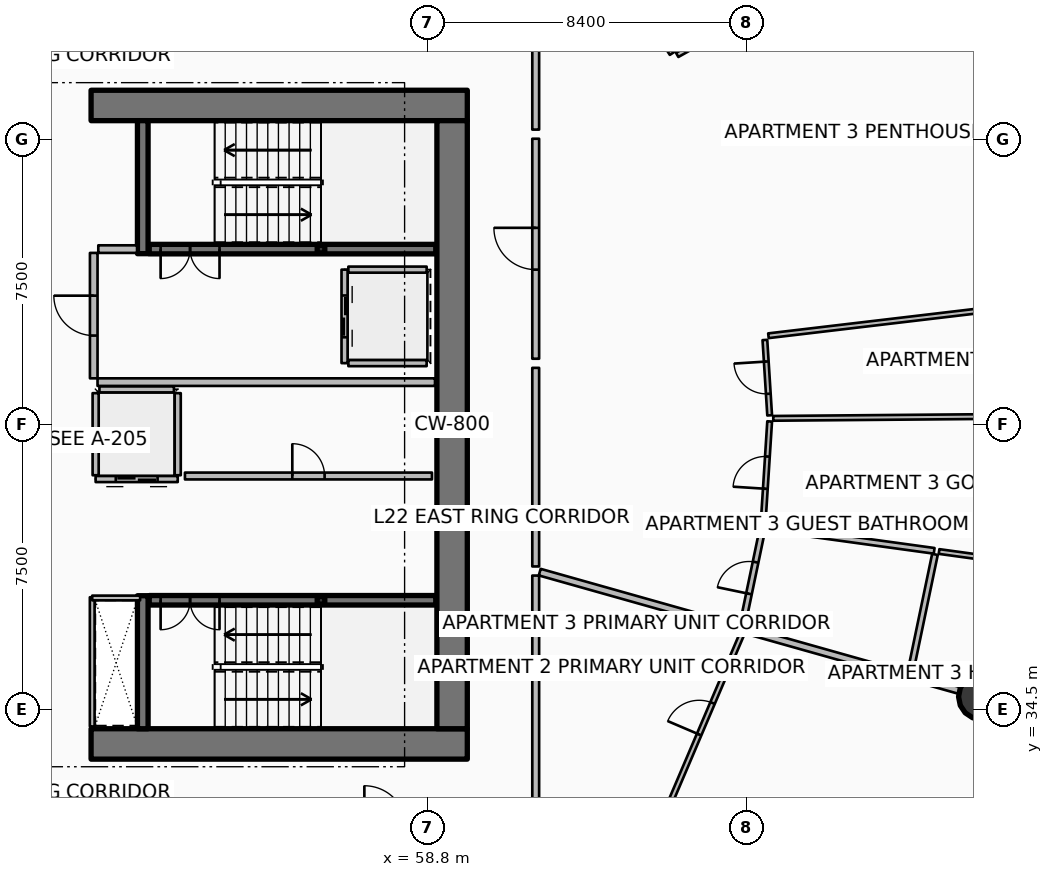
"""IFC4 building model, lengths in metres.
Left out: names, types, materials, properties, quantities, classifications, styles, units other than length and angle.
Written with IfcOpenShell. Run it as: python <this file> out.ifc"""

import sys

from ifc_helpers import new_model, si_unit, direction, frame, frame_2d, origin, origin_2d, place, context, subcontext, project, spatial, rectangle, hollow_rectangle, circle, extrude, element, fill, save


model = new_model("IFC4")
c1 = context("Model", 3, precision=1e-05, world=origin(), true_north=direction((0.0, 1.0)))
c2 = subcontext(c1, "Body", "Model", "MODEL_VIEW")
j1 = project(units=[si_unit("LENGTHUNIT", "METRE"), si_unit("PLANEANGLEUNIT", "RADIAN")], contexts=[c1])
p1 = place(None, origin())
s1 = spatial("IfcSite", under=j1, at=p1, CompositionType="ELEMENT")
p2 = place(p1, origin())
s2 = spatial("IfcBuilding", under=s1, at=p2, CompositionType="ELEMENT")
p3 = place(p2, frame((0.0, 0.0, 90.15)))
s3 = spatial("IfcBuildingStorey", under=s2, at=p3, CompositionType="ELEMENT", Elevation=90.15)
for number, where, z_axis, x_axis in (
    (1, (49.95, 33.6, 0.0), (0.0, 0.0, 1.0), (1.0, 0.0, 0.0)),
    (2, (49.95, 50.4, 0.0), (0.0, 0.0, 1.0), (1.0, 0.0, 0.0)),
):
    element("IfcWall", number, at=place(p3, frame(where, z_axis=z_axis, x_axis=x_axis)), inside=s3, PredefinedType="SHEAR", context=c2, shape_type="SweptSolid", body=[
        extrude(rectangle(XDim=9.9, YDim=0.8, at=frame_2d((4.95, 0.0))), origin(), (0.0, 0.0, 1.0), 3.75),
    ])
p4 = place(p3, frame((59.45, 34.0, 0.0), z_axis=(0.0, 0.0, 1.0), x_axis=(0.0, 1.0, 0.0)))
e3 = element("IfcWall", 3, at=p4, inside=s3, PredefinedType="SHEAR", context=c2, shape_type="SweptSolid", body=[
    extrude(rectangle(XDim=16.0, YDim=0.8, at=frame_2d((8.0, 0.0))), origin(), (0.0, 0.0, 1.0), 3.75),
])
for number, where, z_axis, x_axis in (
    (4, (51.31, 46.5, 0.0), (0.0, 0.0, 1.0), (0.0, 1.0, 0.0)),
    (5, (51.31, 34.0, 0.0), (0.0, 0.0, 1.0), (0.0, 1.0, 0.0)),
):
    element("IfcWall", number, at=place(p3, frame(where, z_axis=z_axis, x_axis=x_axis)), inside=s3, PredefinedType="SHEAR", context=c2, shape_type="SweptSolid", body=[
        extrude(rectangle(XDim=3.5, YDim=0.28, at=frame_2d((1.75, 0.0))), origin(), (0.0, 0.0, 1.0), 3.75),
    ])
for number, where, z_axis, x_axis in (
    (6, (56.0, 46.62, 0.0), (0.0, 0.0, 1.0), (1.0, 0.0, 0.0)),
    (7, (56.0, 37.38, 0.0), (0.0, 0.0, 1.0), (1.0, 0.0, 0.0)),
):
    element("IfcColumn", number, at=place(p3, frame(where, z_axis=z_axis, x_axis=x_axis)), inside=s3, PredefinedType="COLUMN", context=c2, shape_type="SweptSolid", body=[
        extrude(hollow_rectangle(XDim=0.2, YDim=0.2, WallThickness=0.01, InnerFilletRadius=0.01, OuterFilletRadius=0.02, at=origin_2d()), origin(), (0.0, 0.0, 1.0), 1.67),
    ])
p5 = place(p3, frame((73.377, 34.843, 0.0), z_axis=(0.0, 0.0, 1.0), x_axis=(1.0, 0.0, 0.0)))
e8 = element("IfcColumn", 8, at=p5, inside=s3, PredefinedType="COLUMN", context=c2, shape_type="SweptSolid", body=[
    extrude(circle(Radius=0.6, at=origin_2d()), origin(), (0.0, 0.0, 1.0), 3.5),
])
p6 = place(p3, frame((68.593, 25.702, 0.0), z_axis=(0.0, 0.0, 1.0), x_axis=(0.636704975, 0.771107498868, 0.0)))
e9 = element("IfcWall", 9, at=p6, inside=s3, PredefinedType="SOLIDWALL", context=c2, shape_type="SweptSolid", body=[
    extrude(rectangle(XDim=11.084, YDim=0.24, at=frame_2d((5.542, 0.0))), origin(), (0.0, 0.0, 1.0), 2.45),
])
p7 = place(p6, frame((8.864, 0.0, 0.0)))
e10 = element("IfcOpeningElement", 10, at=p7, cuts=e9, PredefinedType="OPENING", context=c2, shape_type="SweptSolid", body=[
    extrude(rectangle(XDim=1.45, YDim=2.15, at=frame_2d((0.725, 1.075))), frame((0.0, 0.13, 0.0), z_axis=(0.0, -1.0, 0.0), x_axis=(1.0, 0.0, 0.0)), (0.0, 0.0, 1.0), 0.26),
])
p8 = place(p6, frame((0.28, 0.0, 0.65)))
e11 = element("IfcOpeningElement", 11, at=p8, cuts=e9, PredefinedType="OPENING", context=c2, shape_type="SweptSolid", body=[
    extrude(rectangle(XDim=1.6, YDim=1.5, at=frame_2d((0.8, 0.75))), frame((0.0, 0.13, 0.0), z_axis=(0.0, -1.0, 0.0), x_axis=(1.0, 0.0, 0.0)), (0.0, 0.0, 1.0), 0.26),
])
p9 = place(p3, frame((51.48, 46.62, 0.0), z_axis=(0.0, 0.0, 1.0), x_axis=(1.0, 0.0, 0.0)))
e12 = element("IfcWall", 12, at=p9, inside=s3, PredefinedType="SOLIDWALL", context=c2, shape_type="SweptSolid", body=[
    extrude(rectangle(XDim=7.54, YDim=0.25, at=frame_2d((3.77, 0.0))), origin(), (0.0, 0.0, 1.0), 3.5),
])
p10 = place(p9, frame((0.3, 0.0, 0.0)))
e13 = element("IfcOpeningElement", 13, at=p10, cuts=e12, PredefinedType="OPENING", context=c2, shape_type="SweptSolid", body=[
    extrude(rectangle(XDim=1.55, YDim=2.15, at=frame_2d((0.775, 1.075))), frame((0.0, 0.135, 0.0), z_axis=(0.0, -1.0, 0.0), x_axis=(1.0, 0.0, 0.0)), (0.0, 0.0, 1.0), 0.27),
])
p11 = place(p3, frame((51.48, 37.38, 0.0), z_axis=(0.0, 0.0, 1.0), x_axis=(1.0, 0.0, 0.0)))
e14 = element("IfcWall", 14, at=p11, inside=s3, PredefinedType="SOLIDWALL", context=c2, shape_type="SweptSolid", body=[
    extrude(rectangle(XDim=7.54, YDim=0.25, at=frame_2d((3.77, 0.0))), origin(), (0.0, 0.0, 1.0), 3.5),
])
p12 = place(p11, frame((0.3, 0.0, 0.0)))
e15 = element("IfcOpeningElement", 15, at=p12, cuts=e14, PredefinedType="OPENING", context=c2, shape_type="SweptSolid", body=[
    extrude(rectangle(XDim=1.55, YDim=2.15, at=frame_2d((0.775, 1.075))), frame((0.0, 0.135, 0.0), z_axis=(0.0, -1.0, 0.0), x_axis=(1.0, 0.0, 0.0)), (0.0, 0.0, 1.0), 0.27),
])
p13 = place(p3, frame((56.62, 46.08, 0.0), z_axis=(0.0, 0.0, 1.0), x_axis=(0.0, -1.0, 0.0)))
e16 = element("IfcWall", 16, at=p13, inside=s3, PredefinedType="PARTITIONING", context=c2, shape_type="SweptSolid", body=[
    extrude(rectangle(XDim=2.46, YDim=0.16, at=frame_2d((1.23, 0.0))), origin(), (0.0, 0.0, 1.0), 3.5),
])
p14 = place(p13, frame((0.68, 0.0, 0.0)))
e17 = element("IfcOpeningElement", 17, at=p14, cuts=e16, PredefinedType="OPENING", context=c2, shape_type="SweptSolid", body=[
    extrude(rectangle(XDim=1.1, YDim=2.1, at=frame_2d((0.55, 1.05))), frame((0.0, 0.09, 0.0), z_axis=(0.0, -1.0, 0.0), x_axis=(1.0, 0.0, 0.0)), (0.0, 0.0, 1.0), 0.18),
])
for number, where, z_axis, x_axis in (
    (18, (56.72, 46.08, 0.0), (0.0, 0.0, 1.0), (1.0, 0.0, 0.0)),
    (19, (56.72, 43.62, 0.0), (0.0, 0.0, 1.0), (1.0, 0.0, 0.0)),
):
    element("IfcWall", number, at=place(p3, frame(where, z_axis=z_axis, x_axis=x_axis)), inside=s3, PredefinedType="PARTITIONING", context=c2, shape_type="SweptSolid", body=[
        extrude(rectangle(XDim=2.06, YDim=0.16, at=frame_2d((1.03, 0.0))), origin(), (0.0, 0.0, 1.0), 3.5),
    ])
p15 = place(p3, frame((52.23, 40.57, 0.0), z_axis=(0.0, 0.0, 1.0), x_axis=(-1.0, 0.0, 0.0)))
e20 = element("IfcWall", 20, at=p15, inside=s3, PredefinedType="PARTITIONING", context=c2, shape_type="SweptSolid", body=[
    extrude(rectangle(XDim=2.16, YDim=0.16, at=frame_2d((1.08, 0.0))), origin(), (0.0, 0.0, 1.0), 3.5),
])
p16 = place(p15, frame((0.53, 0.0, 0.0)))
e21 = element("IfcOpeningElement", 21, at=p16, cuts=e20, PredefinedType="OPENING", context=c2, shape_type="SweptSolid", body=[
    extrude(rectangle(XDim=1.1, YDim=2.1, at=frame_2d((0.55, 1.05))), frame((0.0, 0.09, 0.0), z_axis=(0.0, -1.0, 0.0), x_axis=(1.0, 0.0, 0.0)), (0.0, 0.0, 1.0), 0.18),
])
for number, where, z_axis, x_axis in (
    (22, (52.23, 40.67, 0.0), (0.0, 0.0, 1.0), (0.0, 1.0, 0.0)),
    (23, (50.07, 40.67, 0.0), (0.0, 0.0, 1.0), (0.0, 1.0, 0.0)),
):
    element("IfcWall", number, at=place(p3, frame(where, z_axis=z_axis, x_axis=x_axis)), inside=s3, PredefinedType="PARTITIONING", context=c2, shape_type="SweptSolid", body=[
        extrude(rectangle(XDim=2.16, YDim=0.16, at=frame_2d((1.08, 0.0))), origin(), (0.0, 0.0, 1.0), 3.5),
    ])
p17 = place(p3, frame((50.17, 42.93, 0.0), z_axis=(0.0, 0.0, 1.0), x_axis=(1.0, 0.0, 0.0)))
e24 = element("IfcWall", 24, at=p17, inside=s3, PredefinedType="PARTITIONING", context=c2, shape_type="SweptSolid", body=[
    extrude(rectangle(XDim=1.96, YDim=0.16, at=frame_2d((0.98, 0.0))), origin(), (0.0, 0.0, 1.0), 3.5),
])
p18 = place(p3, frame((52.42, 40.65, 0.0), z_axis=(0.0, 0.0, 1.0), x_axis=(1.0, 0.0, 0.0)))
e25 = element("IfcWall", 25, at=p18, inside=s3, PredefinedType="PARTITIONING", context=c2, shape_type="SweptSolid", body=[
    extrude(rectangle(XDim=6.5, YDim=0.18, at=frame_2d((3.25, 0.0))), origin(), (0.0, 0.0, 1.0), 3.5),
])
p19 = place(p18, frame((2.825, 0.0, 0.0)))
e26 = element("IfcOpeningElement", 26, at=p19, cuts=e25, PredefinedType="OPENING", context=c2, shape_type="SweptSolid", body=[
    extrude(rectangle(XDim=0.85, YDim=2.06, at=frame_2d((0.425, 1.03))), frame((0.0, 0.1, 0.0), z_axis=(0.0, -1.0, 0.0), x_axis=(1.0, 0.0, 0.0)), (0.0, 0.0, 1.0), 0.2),
])
p20 = place(p3, frame((50.12, 43.12, 0.0), z_axis=(0.0, 0.0, 1.0), x_axis=(1.0, 0.0, 0.0)))
e27 = element("IfcWall", 27, at=p20, inside=s3, PredefinedType="PARTITIONING", context=c2, shape_type="SweptSolid", body=[
    extrude(rectangle(XDim=8.88, YDim=0.2, at=frame_2d((4.44, 0.0))), origin(), (0.0, 0.0, 1.0), 3.5),
])
p21 = place(p3, frame((50.14, 46.62, 0.0), z_axis=(0.0, 0.0, 1.0), x_axis=(1.0, 0.0, 0.0)))
e28 = element("IfcWall", 28, at=p21, inside=s3, PredefinedType="PARTITIONING", context=c2, shape_type="SweptSolid", body=[
    extrude(rectangle(XDim=1.02, YDim=0.2, at=frame_2d((0.51, 0.0))), origin(), (0.0, 0.0, 1.0), 3.5),
])
p22 = place(p3, frame((50.02, 43.22, 0.0), z_axis=(0.0, 0.0, 1.0), x_axis=(0.0, 1.0, 0.0)))
e29 = element("IfcWall", 29, at=p22, inside=s3, PredefinedType="PARTITIONING", context=c2, shape_type="SweptSolid", body=[
    extrude(rectangle(XDim=3.3, YDim=0.2, at=frame_2d((1.65, 0.0))), origin(), (0.0, 0.0, 1.0), 3.5),
])
p23 = place(p22, frame((1.125, 0.0, 0.0)))
e30 = element("IfcOpeningElement", 30, at=p23, cuts=e29, PredefinedType="OPENING", context=c2, shape_type="SweptSolid", body=[
    extrude(rectangle(XDim=1.05, YDim=2.1, at=frame_2d((0.525, 1.05))), frame((0.0, 0.11, 0.0), z_axis=(0.0, -1.0, 0.0), x_axis=(1.0, 0.0, 0.0)), (0.0, 0.0, 1.0), 0.22),
])
p24 = place(p3, frame((49.98, 34.06, 0.0), z_axis=(0.0, 0.0, 1.0), x_axis=(0.0, 1.0, 0.0)))
e31 = element("IfcWall", 31, at=p24, inside=s3, PredefinedType="PARTITIONING", context=c2, shape_type="SweptSolid", body=[
    extrude(rectangle(XDim=3.4, YDim=0.125, at=frame_2d((1.7, 0.0))), origin(), (0.0, 0.0, 1.0), 2.94),
])
p25 = place(p3, frame((49.98, 37.44, 0.0), z_axis=(0.0, 0.0, 1.0), x_axis=(1.0, 0.0, 0.0)))
e32 = element("IfcWall", 32, at=p25, inside=s3, PredefinedType="PARTITIONING", context=c2, shape_type="SweptSolid", body=[
    extrude(rectangle(XDim=1.26, YDim=0.125, at=frame_2d((0.63, 0.0))), origin(), (0.0, 0.0, 1.0), 2.94),
])
p26 = place(p3, frame((61.756, 38.12, 0.0), z_axis=(0.0, 0.0, 1.0), x_axis=(0.962455861176, -0.271438234756, 0.0)))
e33 = element("IfcWall", 33, at=p26, inside=s3, PredefinedType="PARTITIONING", context=c2, shape_type="SweptSolid", body=[
    extrude(rectangle(XDim=14.279, YDim=0.18, at=frame_2d((7.139, 0.0))), origin(), (0.0, 0.0, 1.0), 2.94),
])
p27 = place(p3, frame((61.65, 31.52, 0.0), z_axis=(0.0, 0.0, 1.0), x_axis=(0.0, 1.0, 0.0)))
e34 = element("IfcWall", 34, at=p27, inside=s3, PredefinedType="PARTITIONING", context=c2, shape_type="SweptSolid", body=[
    extrude(rectangle(XDim=6.51, YDim=0.18, at=frame_2d((3.255, 0.0))), origin(), (0.0, 0.0, 1.0), 2.94),
])
p28 = place(p3, frame((65.168, 32.012, 0.0), z_axis=(0.0, 0.0, 1.0), x_axis=(0.392094288326, 0.91992503448, 0.0)))
e35 = element("IfcWall", 35, at=p28, inside=s3, PredefinedType="PARTITIONING", context=c2, shape_type="SweptSolid", body=[
    extrude(rectangle(XDim=4.894, YDim=0.125, at=frame_2d((2.447, 0.0))), origin(), (0.0, 0.0, 1.0), 2.94),
])
p29 = place(p28, frame((1.997, 0.0, 0.0)))
e36 = element("IfcOpeningElement", 36, at=p29, cuts=e35, PredefinedType="OPENING", context=c2, shape_type="SweptSolid", body=[
    extrude(rectangle(XDim=0.9, YDim=2.08, at=frame_2d((0.45, 1.04))), frame((0.0, 0.073, 0.0), z_axis=(0.0, -1.0, 0.0), x_axis=(1.0, 0.0, 0.0)), (0.0, 0.0, 1.0), 0.145),
])
p30 = place(p3, frame((61.65, 43.736, 0.0), z_axis=(0.0, 0.0, 1.0), x_axis=(0.0, 1.0, 0.0)))
e37 = element("IfcWall", 37, at=p30, inside=s3, PredefinedType="PARTITIONING", context=c2, shape_type="SweptSolid", body=[
    extrude(rectangle(XDim=5.789, YDim=0.18, at=frame_2d((2.895, 0.0))), origin(), (0.0, 0.0, 1.0), 2.94),
])
p31 = place(p30, frame((2.344, 0.0, 0.0)))
e38 = element("IfcOpeningElement", 38, at=p31, cuts=e37, PredefinedType="OPENING", context=c2, shape_type="SweptSolid", body=[
    extrude(rectangle(XDim=1.1, YDim=2.1, at=frame_2d((0.55, 1.05))), frame((0.0, 0.1, 0.0), z_axis=(0.0, -1.0, 0.0), x_axis=(1.0, 0.0, 0.0)), (0.0, 0.0, 1.0), 0.2),
])
p32 = place(p3, frame((61.65, 38.27, 0.0), z_axis=(0.0, 0.0, 1.0), x_axis=(0.0, 1.0, 0.0)))
e39 = element("IfcWall", 39, at=p32, inside=s3, PredefinedType="PARTITIONING", context=c2, shape_type="SweptSolid", body=[
    extrude(rectangle(XDim=5.225, YDim=0.18, at=frame_2d((2.613, 0.0))), origin(), (0.0, 0.0, 1.0), 2.94),
])
p33 = place(p3, frame((67.774, 44.341, 0.0), z_axis=(0.0, 0.0, 1.0), x_axis=(0.993071471329, 0.117511926341, 0.0)))
e40 = element("IfcWall", 40, at=p33, inside=s3, PredefinedType="PARTITIONING", context=c2, shape_type="SweptSolid", body=[
    extrude(rectangle(XDim=9.567, YDim=0.125, at=frame_2d((4.784, 0.0))), origin(), (0.0, 0.0, 1.0), 2.94),
])
p34 = place(p3, frame((67.089, 36.72, 0.0), z_axis=(0.0, 0.0, 1.0), x_axis=(0.204314138463, 0.978905374806, 0.0)))
e41 = element("IfcWall", 41, at=p34, inside=s3, PredefinedType="PARTITIONING", context=c2, shape_type="SweptSolid", body=[
    extrude(rectangle(XDim=2.546, YDim=0.15, at=frame_2d((1.273, 0.0))), origin(), (0.0, 0.0, 1.0), 2.94),
])
p35 = place(p34, frame((0.848, 0.0, 0.0)))
e42 = element("IfcOpeningElement", 42, at=p35, cuts=e41, PredefinedType="OPENING", context=c2, shape_type="SweptSolid", body=[
    extrude(rectangle(XDim=0.85, YDim=2.06, at=frame_2d((0.425, 1.03))), frame((0.0, 0.085, 0.0), z_axis=(0.0, -1.0, 0.0), x_axis=(1.0, 0.0, 0.0)), (0.0, 0.0, 1.0), 0.17),
])
p36 = place(p3, frame((71.506, 35.474, 0.0), z_axis=(0.0, 0.0, 1.0), x_axis=(0.204346617078, 0.978898595407, 0.0)))
e43 = element("IfcWall", 43, at=p36, inside=s3, PredefinedType="PARTITIONING", context=c2, shape_type="SweptSolid", body=[
    extrude(rectangle(XDim=3.18, YDim=0.15, at=frame_2d((1.59, 0.0))), origin(), (0.0, 0.0, 1.0), 2.94),
])
p37 = place(p3, frame((67.717, 39.289, 0.0), z_axis=(0.0, 0.0, 1.0), x_axis=(0.99067496126, -0.136246545396, 0.0)))
e44 = element("IfcWall", 44, at=p37, inside=s3, PredefinedType="PARTITIONING", context=c2, shape_type="SweptSolid", body=[
    extrude(rectangle(XDim=4.46, YDim=0.15, at=frame_2d((2.23, 0.0))), origin(), (0.0, 0.0, 1.0), 2.94),
])
p38 = place(p3, frame((72.264, 38.663, 0.0), z_axis=(0.0, 0.0, 1.0), x_axis=(0.990677467282, -0.136228322381, 0.0)))
e45 = element("IfcWall", 45, at=p38, inside=s3, PredefinedType="PARTITIONING", context=c2, shape_type="SweptSolid", body=[
    extrude(rectangle(XDim=4.201, YDim=0.125, at=frame_2d((2.1, 0.0))), origin(), (0.0, 0.0, 1.0), 2.94),
])
p39 = place(p38, frame((1.675, 0.0, 0.0)))
e46 = element("IfcOpeningElement", 46, at=p39, cuts=e45, PredefinedType="OPENING", context=c2, shape_type="SweptSolid", body=[
    extrude(rectangle(XDim=0.85, YDim=2.06, at=frame_2d((0.425, 1.03))), frame((0.0, 0.073, 0.0), z_axis=(0.0, -1.0, 0.0), x_axis=(1.0, 0.0, 0.0)), (0.0, 0.0, 1.0), 0.145),
])
p40 = place(p3, frame((67.901, 42.167, 0.0), z_axis=(0.0, 0.0, 1.0), x_axis=(0.999964927596, 0.008375176238, 0.0)))
e47 = element("IfcWall", 47, at=p40, inside=s3, PredefinedType="PARTITIONING", context=c2, shape_type="SweptSolid", body=[
    extrude(rectangle(XDim=9.416, YDim=0.125, at=frame_2d((4.708, 0.0))), origin(), (0.0, 0.0, 1.0), 2.94),
])
p41 = place(p3, frame((67.633, 39.391, 0.0), z_axis=(0.0, 0.0, 1.0), x_axis=(0.064077427582, 0.997944929981, 0.0)))
e48 = element("IfcWall", 48, at=p41, inside=s3, PredefinedType="PARTITIONING", context=c2, shape_type="SweptSolid", body=[
    extrude(rectangle(XDim=2.701, YDim=0.125, at=frame_2d((1.351, 0.0))), origin(), (0.0, 0.0, 1.0), 2.94),
])
p42 = place(p41, frame((0.926, 0.0, 0.0)))
e49 = element("IfcOpeningElement", 49, at=p42, cuts=e48, PredefinedType="OPENING", context=c2, shape_type="SweptSolid", body=[
    extrude(rectangle(XDim=0.85, YDim=2.06, at=frame_2d((0.425, 1.03))), frame((0.0, 0.073, 0.0), z_axis=(0.0, -1.0, 0.0), x_axis=(1.0, 0.0, 0.0)), (0.0, 0.0, 1.0), 0.145),
])
p43 = place(p3, frame((67.806, 42.246, 0.0), z_axis=(0.0, 0.0, 1.0), x_axis=(-0.06315855722, 0.998003505329, 0.0)))
e50 = element("IfcWall", 50, at=p43, inside=s3, PredefinedType="PARTITIONING", context=c2, shape_type="SweptSolid", body=[
    extrude(rectangle(XDim=1.987, YDim=0.125, at=frame_2d((0.993, 0.0))), origin(), (0.0, 0.0, 1.0), 2.94),
])
p44 = place(p43, frame((0.568, 0.0, 0.0)))
e51 = element("IfcOpeningElement", 51, at=p44, cuts=e50, PredefinedType="OPENING", context=c2, shape_type="SweptSolid", body=[
    extrude(rectangle(XDim=0.85, YDim=2.06, at=frame_2d((0.425, 1.03))), frame((0.0, 0.073, 0.0), z_axis=(0.0, -1.0, 0.0), x_axis=(1.0, 0.0, 0.0)), (0.0, 0.0, 1.0), 0.145),
])
p45 = place(p3, frame((61.65, 49.764, 0.0), z_axis=(0.0, 0.0, 1.0), x_axis=(0.0, 1.0, 0.0)))
e52 = element("IfcWall", 52, at=p45, inside=s3, PredefinedType="PARTITIONING", context=c2, shape_type="SweptSolid", body=[
    extrude(rectangle(XDim=2.716, YDim=0.18, at=frame_2d((1.358, 0.0))), origin(), (0.0, 0.0, 1.0), 2.94),
])
p46 = place(p3, frame((65.373, 51.729, 0.0), z_axis=(0.0, 0.0, 1.0), x_axis=(0.872500794254, 0.488612693272, 0.0)))
e53 = element("IfcWall", 53, at=p46, inside=s3, PredefinedType="PARTITIONING", context=c2, shape_type="SweptSolid", body=[
    extrude(rectangle(XDim=9.568, YDim=0.125, at=frame_2d((4.784, 0.0))), origin(), (0.0, 0.0, 1.0), 2.94),
])
p47 = place(p3, frame((65.231, 51.764, 0.0), z_axis=(0.0, 0.0, 1.0), x_axis=(-0.543742324159, 0.839252217702, 0.0)))
e54 = element("IfcWall", 54, at=p47, inside=s3, PredefinedType="PARTITIONING", context=c2, shape_type="SweptSolid", body=[
    extrude(rectangle(XDim=2.37, YDim=0.125, at=frame_2d((1.185, 0.0))), origin(), (0.0, 0.0, 1.0), 2.94),
])
p48 = place(p47, frame((0.76, 0.0, 0.0)))
e55 = element("IfcOpeningElement", 55, at=p48, cuts=e54, PredefinedType="OPENING", context=c2, shape_type="SweptSolid", body=[
    extrude(rectangle(XDim=0.85, YDim=2.06, at=frame_2d((0.425, 1.03))), frame((0.0, 0.073, 0.0), z_axis=(0.0, -1.0, 0.0), x_axis=(1.0, 0.0, 0.0)), (0.0, 0.0, 1.0), 0.145),
])
p49 = place(p10, origin())
e56 = element("IfcDoor", 56, at=p49, inside=s3, OperationType="DOUBLE_DOOR_SINGLE_SWING", PredefinedType="DOOR", context=c2, shape_type="SweptSolid", body=[
    extrude(rectangle(XDim=1.55, YDim=2.15, at=frame_2d((0.775, 1.075))), frame((0.0, 0.025, 0.0), z_axis=(0.0, -1.0, 0.0), x_axis=(1.0, 0.0, 0.0)), (0.0, 0.0, 1.0), 0.05),
])
fill(e13, e56)
p50 = place(p12, origin())
e57 = element("IfcDoor", 57, at=p50, inside=s3, OperationType="DOUBLE_DOOR_SINGLE_SWING", PredefinedType="DOOR", context=c2, shape_type="SweptSolid", body=[
    extrude(rectangle(XDim=1.55, YDim=2.15, at=frame_2d((0.775, 1.075))), frame((0.0, 0.025, 0.0), z_axis=(0.0, -1.0, 0.0), x_axis=(1.0, 0.0, 0.0)), (0.0, 0.0, 1.0), 0.05),
])
fill(e15, e57)
p51 = place(p14, origin())
e58 = element("IfcDoor", 58, at=p51, inside=s3, OperationType="DOUBLE_DOOR_SLIDING", PredefinedType="DOOR", context=c2, shape_type="SweptSolid", body=[
    extrude(rectangle(XDim=1.1, YDim=2.1, at=frame_2d((0.55, 1.05))), frame((0.0, 0.025, 0.0), z_axis=(0.0, -1.0, 0.0), x_axis=(1.0, 0.0, 0.0)), (0.0, 0.0, 1.0), 0.05),
])
fill(e17, e58)
p52 = place(p16, origin())
e59 = element("IfcDoor", 59, at=p52, inside=s3, OperationType="DOUBLE_DOOR_SLIDING", PredefinedType="DOOR", context=c2, shape_type="SweptSolid", body=[
    extrude(rectangle(XDim=1.1, YDim=2.1, at=frame_2d((0.55, 1.05))), frame((0.0, 0.025, 0.0), z_axis=(0.0, -1.0, 0.0), x_axis=(1.0, 0.0, 0.0)), (0.0, 0.0, 1.0), 0.05),
])
fill(e21, e59)
p53 = place(p19, origin())
e60 = element("IfcDoor", 60, at=p53, inside=s3, OperationType="SINGLE_SWING_LEFT", PredefinedType="DOOR", context=c2, shape_type="SweptSolid", body=[
    extrude(rectangle(XDim=0.85, YDim=2.06, at=frame_2d((0.425, 1.03))), frame((0.0, 0.025, 0.0), z_axis=(0.0, -1.0, 0.0), x_axis=(1.0, 0.0, 0.0)), (0.0, 0.0, 1.0), 0.05),
])
fill(e26, e60)
p54 = place(p23, origin())
e61 = element("IfcDoor", 61, at=p54, inside=s3, OperationType="SINGLE_SWING_RIGHT", PredefinedType="DOOR", context=c2, shape_type="SweptSolid", body=[
    extrude(rectangle(XDim=1.05, YDim=2.1, at=frame_2d((0.525, 1.05))), frame((0.0, 0.025, 0.0), z_axis=(0.0, -1.0, 0.0), x_axis=(1.0, 0.0, 0.0)), (0.0, 0.0, 1.0), 0.05),
])
fill(e30, e61)
p55 = place(p29, origin())
e62 = element("IfcDoor", 62, at=p55, inside=s3, OperationType="SINGLE_SWING_LEFT", PredefinedType="DOOR", context=c2, shape_type="SweptSolid", body=[
    extrude(rectangle(XDim=0.9, YDim=2.08, at=frame_2d((0.45, 1.04))), frame((0.0, 0.025, 0.0), z_axis=(0.0, -1.0, 0.0), x_axis=(1.0, 0.0, 0.0)), (0.0, 0.0, 1.0), 0.05),
])
fill(e36, e62)
p56 = place(p31, origin())
e63 = element("IfcDoor", 63, at=p56, inside=s3, OperationType="SINGLE_SWING_RIGHT", PredefinedType="DOOR", context=c2, shape_type="SweptSolid", body=[
    extrude(rectangle(XDim=1.1, YDim=2.1, at=frame_2d((0.55, 1.05))), frame((0.0, 0.025, 0.0), z_axis=(0.0, -1.0, 0.0), x_axis=(1.0, 0.0, 0.0)), (0.0, 0.0, 1.0), 0.05),
])
fill(e38, e63)
p57 = place(p35, origin())
e64 = element("IfcDoor", 64, at=p57, inside=s3, OperationType="SINGLE_SWING_LEFT", PredefinedType="DOOR", context=c2, shape_type="SweptSolid", body=[
    extrude(rectangle(XDim=0.85, YDim=2.06, at=frame_2d((0.425, 1.03))), frame((0.0, 0.025, 0.0), z_axis=(0.0, -1.0, 0.0), x_axis=(1.0, 0.0, 0.0)), (0.0, 0.0, 1.0), 0.05),
])
fill(e42, e64)
p58 = place(p42, origin())
e65 = element("IfcDoor", 65, at=p58, inside=s3, OperationType="SINGLE_SWING_LEFT", PredefinedType="DOOR", context=c2, shape_type="SweptSolid", body=[
    extrude(rectangle(XDim=0.85, YDim=2.06, at=frame_2d((0.425, 1.03))), frame((0.0, 0.025, 0.0), z_axis=(0.0, -1.0, 0.0), x_axis=(1.0, 0.0, 0.0)), (0.0, 0.0, 1.0), 0.05),
])
fill(e49, e65)
p59 = place(p44, origin())
e66 = element("IfcDoor", 66, at=p59, inside=s3, OperationType="SINGLE_SWING_RIGHT", PredefinedType="DOOR", context=c2, shape_type="SweptSolid", body=[
    extrude(rectangle(XDim=0.85, YDim=2.06, at=frame_2d((0.425, 1.03))), frame((0.0, 0.025, 0.0), z_axis=(0.0, -1.0, 0.0), x_axis=(1.0, 0.0, 0.0)), (0.0, 0.0, 1.0), 0.05),
])
fill(e51, e66)
save(model, sys.argv[1])
